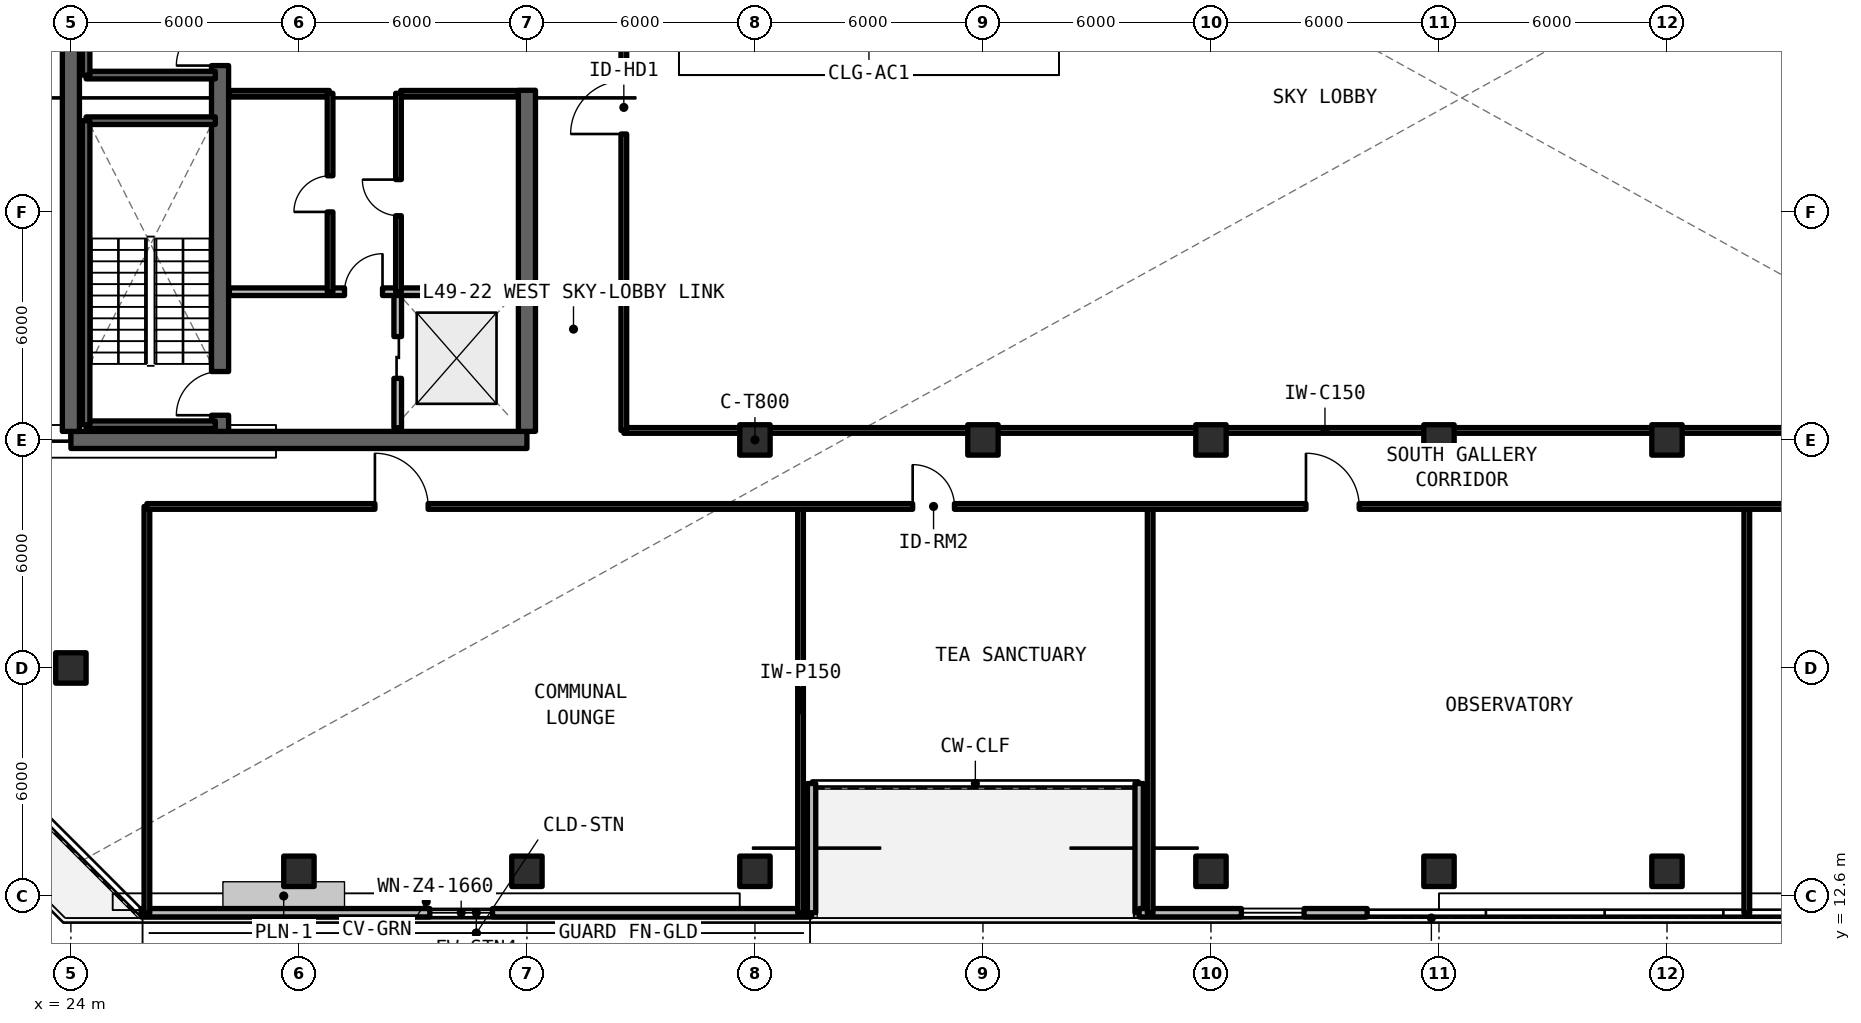
"""IFC4 building model, lengths in metres.
Left out: names, types, materials, properties, quantities, classifications, styles, units other than length and angle.
Written with IfcOpenShell. Run it as: python <this file> out.ifc"""

import sys

from ifc_helpers import new_model, si_unit, direction, frame, frame_2d, origin, origin_2d, place, context, subcontext, project, spatial, rectangle, extrude, element, fill, save


model = new_model("IFC4")
c1 = context("Model", 3, precision=1e-05, world=origin(), true_north=direction((0.0, 1.0)))
c2 = subcontext(c1, "Body", "Model", "MODEL_VIEW")
j1 = project(units=[si_unit("LENGTHUNIT", "METRE"), si_unit("PLANEANGLEUNIT", "RADIAN")], contexts=[c1])
p1 = place(None, origin())
s1 = spatial("IfcSite", under=j1, at=p1, CompositionType="ELEMENT")
p2 = place(p1, origin())
s2 = spatial("IfcBuilding", under=s1, at=p2, CompositionType="ELEMENT")
p3 = place(p2, frame((0.0, 0.0, 177.87)))
s3 = spatial("IfcBuildingStorey", under=s2, at=p3, CompositionType="ELEMENT", Elevation=177.87)
p4 = place(p3, frame((24.0, 24.6, 0.0), z_axis=(0.0, 0.0, 1.0), x_axis=(1.0, 0.0, 0.0)))
e1 = element("IfcWall", 1, at=p4, inside=s3, PredefinedType="SHEAR", context=c2, shape_type="SweptSolid", body=[
    extrude(rectangle(XDim=12.0, YDim=0.45, at=frame_2d((6.0, 0.0))), origin(), (0.0, 0.0, 1.0), 3.96),
])
p5 = place(p3, frame((24.0, 24.825, 0.0), z_axis=(0.0, 0.0, 1.0), x_axis=(0.0, 1.0, 0.0)))
e2 = element("IfcWall", 2, at=p5, inside=s3, PredefinedType="SHEAR", context=c2, shape_type="SweptSolid", body=[
    extrude(rectangle(XDim=17.55, YDim=0.45, at=frame_2d((8.775, 0.0))), origin(), (0.0, 0.0, 1.0), 3.96),
])
p6 = place(p3, frame((36.0, 24.825, 0.0), z_axis=(0.0, 0.0, 1.0), x_axis=(0.0, 1.0, 0.0)))
e3 = element("IfcWall", 3, at=p6, inside=s3, PredefinedType="SHEAR", context=c2, shape_type="SweptSolid", body=[
    extrude(rectangle(XDim=8.975, YDim=0.45, at=frame_2d((4.488, 0.0))), origin(), (0.0, 0.0, 1.0), 3.96),
])
p7 = place(p3, frame((27.925, 24.825, 0.0), z_axis=(0.0, 0.0, 1.0), x_axis=(0.0, 1.0, 0.0)))
e4 = element("IfcWall", 4, at=p7, inside=s3, PredefinedType="SHEAR", context=c2, shape_type="SweptSolid", body=[
    extrude(rectangle(XDim=17.55, YDim=0.45, at=frame_2d((8.775, 0.0))), origin(), (0.0, 0.0, 1.0), 3.96),
])
p8 = place(p7, frame((0.425, 0.0, 0.0)))
e5 = element("IfcOpeningElement", 5, at=p8, cuts=e4, PredefinedType="OPENING", context=c2, shape_type="SweptSolid", body=[
    extrude(rectangle(XDim=1.15, YDim=2.15, at=frame_2d((0.575, 1.075))), frame((0.0, 0.235, 0.0), z_axis=(0.0, -1.0, 0.0), x_axis=(1.0, 0.0, 0.0)), (0.0, 0.0, 1.0), 0.47),
])
p9 = place(p7, frame((9.625, 0.0, 0.0)))
e6 = element("IfcOpeningElement", 6, at=p9, cuts=e4, PredefinedType="OPENING", context=c2, shape_type="SweptSolid", body=[
    extrude(rectangle(XDim=1.15, YDim=2.15, at=frame_2d((0.575, 1.075))), frame((0.0, 0.235, 0.0), z_axis=(0.0, -1.0, 0.0), x_axis=(1.0, 0.0, 0.0)), (0.0, 0.0, 1.0), 0.47),
])
for number, where, z_axis, x_axis in (
    (7, (42.0, 24.6, 0.0), (0.0, 0.0, 1.0), (1.0, 0.0, 0.0)),
    (8, (48.0, 24.6, 0.0), (0.0, 0.0, 1.0), (1.0, 0.0, 0.0)),
    (9, (54.0, 24.6, 0.0), (0.0, 0.0, 1.0), (1.0, 0.0, 0.0)),
    (10, (60.0, 24.6, 0.0), (0.0, 0.0, 1.0), (1.0, 0.0, 0.0)),
    (11, (66.0, 24.6, 0.0), (0.0, 0.0, 1.0), (1.0, 0.0, 0.0)),
    (12, (24.0, 18.6, 0.0), (0.0, 0.0, 1.0), (1.0, 0.0, 0.0)),
):
    element("IfcColumn", number, at=place(p3, frame(where, z_axis=z_axis, x_axis=x_axis)), inside=s3, PredefinedType="COLUMN", context=c2, shape_type="SweptSolid", body=[
        extrude(rectangle(XDim=0.8, YDim=0.8, at=origin_2d()), origin(), (0.0, 0.0, 1.0), 3.96),
    ])
for number, where, z_axis, x_axis in (
    (13, (30.0, 13.25, -0.28), (0.0, 0.0, 1.0), (1.0, 0.0, 0.0)),
    (14, (36.0, 13.25, -0.28), (0.0, 0.0, 1.0), (1.0, 0.0, 0.0)),
    (15, (42.0, 13.25, -0.28), (0.0, 0.0, 1.0), (1.0, 0.0, 0.0)),
    (16, (54.0, 13.25, -0.28), (0.0, 0.0, 1.0), (1.0, 0.0, 0.0)),
    (17, (60.0, 13.25, -0.28), (0.0, 0.0, 1.0), (1.0, 0.0, 0.0)),
    (18, (66.0, 13.25, -0.28), (0.0, 0.0, 1.0), (1.0, 0.0, 0.0)),
):
    element("IfcColumn", number, at=place(p3, frame(where, z_axis=z_axis, x_axis=x_axis)), inside=s3, PredefinedType="COLUMN", context=c2, shape_type="SweptSolid", body=[
        extrude(rectangle(XDim=0.8, YDim=0.8, at=origin_2d()), origin(), (0.0, 0.0, 1.0), 4.24),
    ])
p10 = place(p3, frame((25.846, 12.16, 0.0), z_axis=(0.0, 0.0, 1.0), x_axis=(1.0, 0.0, 0.0)))
e19 = element("IfcWall", 19, at=p10, inside=s3, PredefinedType="SOLIDWALL", context=c2, shape_type="SweptSolid", body=[
    extrude(rectangle(XDim=17.644, YDim=0.22, at=frame_2d((8.822, 0.0))), origin(), (0.0, 0.0, 1.0), 3.74),
])
p11 = place(p10, frame((7.599, 0.0, 0.78)))
e20 = element("IfcOpeningElement", 20, at=p11, cuts=e19, PredefinedType="OPENING", context=c2, shape_type="SweptSolid", body=[
    extrude(rectangle(XDim=1.65, YDim=1.66, at=frame_2d((0.825, 0.83))), frame((0.0, 0.12, 0.0), z_axis=(0.0, -1.0, 0.0), x_axis=(1.0, 0.0, 0.0)), (0.0, 0.0, 1.0), 0.24),
])
for number, where, z_axis, x_axis in (
    (21, (43.49, 12.16, 0.0), (0.0, 0.0, 1.0), (0.0, 1.0, 0.0)),
    (22, (52.11, 15.56, 0.0), (0.0, 0.0, 1.0), (0.0, -1.0, 0.0)),
):
    element("IfcWall", number, at=place(p3, frame(where, z_axis=z_axis, x_axis=x_axis)), inside=s3, PredefinedType="SOLIDWALL", context=c2, shape_type="SweptSolid", body=[
        extrude(rectangle(XDim=3.4, YDim=0.22, at=frame_2d((1.7, 0.0))), origin(), (0.0, 0.0, 1.0), 3.74),
    ])
p12 = place(p3, frame((52.11, 12.16, 0.0), z_axis=(0.0, 0.0, 1.0), x_axis=(1.0, 0.0, 0.0)))
e23 = element("IfcWall", 23, at=p12, inside=s3, PredefinedType="SOLIDWALL", context=c2, shape_type="SweptSolid", body=[
    extrude(rectangle(XDim=6.0, YDim=0.22, at=frame_2d((3.0, 0.0))), origin(), (0.0, 0.0, 1.0), 3.74),
])
p13 = place(p12, frame((2.69, 0.0, 0.78)))
e24 = element("IfcOpeningElement", 24, at=p13, cuts=e23, PredefinedType="OPENING", context=c2, shape_type="SweptSolid", body=[
    extrude(rectangle(XDim=1.65, YDim=1.66, at=frame_2d((0.825, 0.83))), frame((0.0, 0.12, 0.0), z_axis=(0.0, -1.0, 0.0), x_axis=(1.0, 0.0, 0.0)), (0.0, 0.0, 1.0), 0.24),
])
p14 = place(p3, frame((32.6, 24.92, 0.0), z_axis=(0.0, 0.0, 1.0), x_axis=(0.0, 1.0, 0.0)))
e25 = element("IfcWall", 25, at=p14, inside=s3, PredefinedType="SOLIDWALL", context=c2, shape_type="SweptSolid", body=[
    extrude(rectangle(XDim=3.58, YDim=0.2, at=frame_2d((1.79, 0.0))), origin(), (0.0, 0.0, 1.0), 2.96),
])
p15 = place(p14, frame((1.3, 0.0, 0.0)))
e26 = element("IfcOpeningElement", 26, at=p15, cuts=e25, PredefinedType="OPENING", context=c2, shape_type="SweptSolid", body=[
    extrude(rectangle(XDim=1.1, YDim=2.2, at=frame_2d((0.55, 1.1))), frame((0.0, 0.11, 0.0), z_axis=(0.0, -1.0, 0.0), x_axis=(1.0, 0.0, 0.0)), (0.0, 0.0, 1.0), 0.22),
])
p16 = place(p3, frame((28.17, 28.5, 0.0), z_axis=(0.0, 0.0, 1.0), x_axis=(1.0, 0.0, 0.0)))
e27 = element("IfcWall", 27, at=p16, inside=s3, PredefinedType="SOLIDWALL", context=c2, shape_type="SweptSolid", body=[
    extrude(rectangle(XDim=7.585, YDim=0.2, at=frame_2d((3.792, 0.0))), origin(), (0.0, 0.0, 1.0), 2.96),
])
p17 = place(p16, frame((3.03, 0.0, 0.0)))
e28 = element("IfcOpeningElement", 28, at=p17, cuts=e27, PredefinedType="OPENING", context=c2, shape_type="SweptSolid", body=[
    extrude(rectangle(XDim=1.0, YDim=2.15, at=frame_2d((0.5, 1.075))), frame((0.0, 0.11, 0.0), z_axis=(0.0, -1.0, 0.0), x_axis=(1.0, 0.0, 0.0)), (0.0, 0.0, 1.0), 0.22),
])
p18 = place(p3, frame((28.17, 33.72, 0.0), z_axis=(0.0, 0.0, 1.0), x_axis=(1.0, 0.0, 0.0)))
e29 = element("IfcWall", 29, at=p18, inside=s3, PredefinedType="SOLIDWALL", context=c2, shape_type="SweptSolid", body=[
    extrude(rectangle(XDim=2.63, YDim=0.15, at=frame_2d((1.315, 0.0))), origin(), (0.0, 0.0, 1.0), 2.96),
])
p19 = place(p3, frame((30.82, 28.5, 0.0), z_axis=(0.0, 0.0, 1.0), x_axis=(0.0, 1.0, 0.0)))
e30 = element("IfcWall", 30, at=p19, inside=s3, PredefinedType="SOLIDWALL", context=c2, shape_type="SweptSolid", body=[
    extrude(rectangle(XDim=5.22, YDim=0.15, at=frame_2d((2.61, 0.0))), origin(), (0.0, 0.0, 1.0), 2.96),
])
p20 = place(p19, frame((2.1, 0.0, 0.0)))
e31 = element("IfcOpeningElement", 31, at=p20, cuts=e30, PredefinedType="OPENING", context=c2, shape_type="SweptSolid", body=[
    extrude(rectangle(XDim=0.95, YDim=2.15, at=frame_2d((0.475, 1.075))), frame((0.0, 0.085, 0.0), z_axis=(0.0, -1.0, 0.0), x_axis=(1.0, 0.0, 0.0)), (0.0, 0.0, 1.0), 0.17),
])
p21 = place(p3, frame((32.68, 33.72, 0.0), z_axis=(0.0, 0.0, 1.0), x_axis=(1.0, 0.0, 0.0)))
e32 = element("IfcWall", 32, at=p21, inside=s3, PredefinedType="SOLIDWALL", context=c2, shape_type="SweptSolid", body=[
    extrude(rectangle(XDim=3.075, YDim=0.15, at=frame_2d((1.538, 0.0))), origin(), (0.0, 0.0, 1.0), 2.96),
])
p22 = place(p3, frame((32.62, 28.5, 0.0), z_axis=(0.0, 0.0, 1.0), x_axis=(0.0, 1.0, 0.0)))
e33 = element("IfcWall", 33, at=p22, inside=s3, PredefinedType="SOLIDWALL", context=c2, shape_type="SweptSolid", body=[
    extrude(rectangle(XDim=5.22, YDim=0.15, at=frame_2d((2.61, 0.0))), origin(), (0.0, 0.0, 1.0), 2.96),
])
p23 = place(p22, frame((2.0, 0.0, 0.0)))
e34 = element("IfcOpeningElement", 34, at=p23, cuts=e33, PredefinedType="OPENING", context=c2, shape_type="SweptSolid", body=[
    extrude(rectangle(XDim=0.95, YDim=2.15, at=frame_2d((0.475, 1.075))), frame((0.0, 0.085, 0.0), z_axis=(0.0, -1.0, 0.0), x_axis=(1.0, 0.0, 0.0)), (0.0, 0.0, 1.0), 0.17),
])
p24 = place(p3, frame((38.55, 24.85, 0.0), z_axis=(0.0, 0.0, 1.0), x_axis=(1.0, 0.0, 0.0)))
e35 = element("IfcWall", 35, at=p24, inside=s3, PredefinedType="SOLIDWALL", context=c2, shape_type="SweptSolid", body=[
    extrude(rectangle(XDim=36.9, YDim=0.15, at=frame_2d((18.45, 0.0))), origin(), (0.0, 0.0, 1.0), 2.96),
])
p25 = place(p3, frame((38.55, 24.85, 0.0), z_axis=(0.0, 0.0, 1.0), x_axis=(0.0, 1.0, 0.0)))
e36 = element("IfcWall", 36, at=p25, inside=s3, PredefinedType="SOLIDWALL", context=c2, shape_type="SweptSolid", body=[
    extrude(rectangle(XDim=17.5, YDim=0.15, at=frame_2d((8.75, 0.0))), origin(), (0.0, 0.0, 1.0), 2.96),
])
p26 = place(p25, frame((7.8, 0.0, 0.0)))
e37 = element("IfcOpeningElement", 37, at=p26, cuts=e36, PredefinedType="OPENING", context=c2, shape_type="SweptSolid", body=[
    extrude(rectangle(XDim=1.4, YDim=2.15, at=frame_2d((0.7, 1.075))), frame((0.0, 0.085, 0.0), z_axis=(0.0, -1.0, 0.0), x_axis=(1.0, 0.0, 0.0)), (0.0, 0.0, 1.0), 0.17),
])
p27 = place(p3, frame((26.0, 12.15, 0.0), z_axis=(0.0, 0.0, 1.0), x_axis=(0.0, 1.0, 0.0)))
e38 = element("IfcWall", 38, at=p27, inside=s3, PredefinedType="SOLIDWALL", context=c2, shape_type="SweptSolid", body=[
    extrude(rectangle(XDim=10.7, YDim=0.15, at=frame_2d((5.35, 0.0))), origin(), (0.0, 0.0, 1.0), 2.96),
])
for number, where, z_axis, x_axis in (
    (39, (43.2, 12.15, 0.0), (0.0, 0.0, 1.0), (0.0, 1.0, 0.0)),
    (40, (52.4, 12.15, 0.0), (0.0, 0.0, 1.0), (0.0, 1.0, 0.0)),
    (41, (68.1, 12.15, 0.0), (0.0, 0.0, 1.0), (0.0, 1.0, 0.0)),
):
    element("IfcWall", number, at=place(p3, frame(where, z_axis=z_axis, x_axis=x_axis)), inside=s3, PredefinedType="PARTITIONING", context=c2, shape_type="SweptSolid", body=[
        extrude(rectangle(XDim=10.7, YDim=0.15, at=frame_2d((5.35, 0.0))), origin(), (0.0, 0.0, 1.0), 2.96),
    ])
p28 = place(p3, frame((26.0, 22.85, 0.0), z_axis=(0.0, 0.0, 1.0), x_axis=(1.0, 0.0, 0.0)))
e42 = element("IfcWall", 42, at=p28, inside=s3, PredefinedType="SOLIDWALL", context=c2, shape_type="SweptSolid", body=[
    extrude(rectangle(XDim=69.2, YDim=0.15, at=frame_2d((34.6, 0.0))), origin(), (0.0, 0.0, 1.0), 2.96),
])
p29 = place(p28, frame((6.0, 0.0, 0.0)))
e43 = element("IfcOpeningElement", 43, at=p29, cuts=e42, PredefinedType="OPENING", context=c2, shape_type="SweptSolid", body=[
    extrude(rectangle(XDim=1.4, YDim=2.15, at=frame_2d((0.7, 1.075))), frame((0.0, 0.085, 0.0), z_axis=(0.0, -1.0, 0.0), x_axis=(1.0, 0.0, 0.0)), (0.0, 0.0, 1.0), 0.17),
])
p30 = place(p28, frame((20.15, 0.0, 0.0)))
e44 = element("IfcOpeningElement", 44, at=p30, cuts=e42, PredefinedType="OPENING", context=c2, shape_type="SweptSolid", body=[
    extrude(rectangle(XDim=1.1, YDim=2.15, at=frame_2d((0.55, 1.075))), frame((0.0, 0.085, 0.0), z_axis=(0.0, -1.0, 0.0), x_axis=(1.0, 0.0, 0.0)), (0.0, 0.0, 1.0), 0.17),
])
p31 = place(p28, frame((30.5, 0.0, 0.0)))
e45 = element("IfcOpeningElement", 45, at=p31, cuts=e42, PredefinedType="OPENING", context=c2, shape_type="SweptSolid", body=[
    extrude(rectangle(XDim=1.4, YDim=2.15, at=frame_2d((0.7, 1.075))), frame((0.0, 0.085, 0.0), z_axis=(0.0, -1.0, 0.0), x_axis=(1.0, 0.0, 0.0)), (0.0, 0.0, 1.0), 0.17),
])
p32 = place(p28, frame((47.0, 0.0, 0.0)))
e46 = element("IfcOpeningElement", 46, at=p32, cuts=e42, PredefinedType="OPENING", context=c2, shape_type="SweptSolid", body=[
    extrude(rectangle(XDim=0.95, YDim=2.15, at=frame_2d((0.475, 1.075))), frame((0.0, 0.085, 0.0), z_axis=(0.0, -1.0, 0.0), x_axis=(1.0, 0.0, 0.0)), (0.0, 0.0, 1.0), 0.17),
])
for number, where, z_axis, x_axis in (
    (47, (24.4, 25.0, 0.0), (0.0, 0.0, 1.0), (1.0, 0.0, 0.0)),
    (48, (27.8, 33.0, 0.0), (0.0, 0.0, 1.0), (-1.0, 0.0, 0.0)),
):
    element("IfcWall", number, at=place(p3, frame(where, z_axis=z_axis, x_axis=x_axis)), inside=s3, PredefinedType="SOLIDWALL", context=c2, shape_type="SweptSolid", body=[
        extrude(rectangle(XDim=3.4, YDim=0.2, at=frame_2d((1.7, 0.0))), origin(), (0.0, 0.0, 1.0), 3.96),
    ])
p33 = place(p3, frame((24.4, 33.0, 0.0), z_axis=(0.0, 0.0, 1.0), x_axis=(0.0, -1.0, 0.0)))
e49 = element("IfcWall", 49, at=p33, inside=s3, PredefinedType="SOLIDWALL", context=c2, shape_type="SweptSolid", body=[
    extrude(rectangle(XDim=8.0, YDim=0.2, at=frame_2d((4.0, 0.0))), origin(), (0.0, 0.0, 1.0), 3.96),
])
p34 = place(p3, frame((24.4, 34.2, 0.0), z_axis=(0.0, 0.0, 1.0), x_axis=(1.0, 0.0, 0.0)))
e50 = element("IfcWall", 50, at=p34, inside=s3, PredefinedType="SOLIDWALL", context=c2, shape_type="SweptSolid", body=[
    extrude(rectangle(XDim=3.4, YDim=0.2, at=frame_2d((1.7, 0.0))), origin(), (0.0, 0.0, 1.0), 3.96),
])
p35 = place(p3, frame((24.4, 42.2, 0.0), z_axis=(0.0, 0.0, 1.0), x_axis=(0.0, -1.0, 0.0)))
e51 = element("IfcWall", 51, at=p35, inside=s3, PredefinedType="SOLIDWALL", context=c2, shape_type="SweptSolid", body=[
    extrude(rectangle(XDim=8.0, YDim=0.2, at=frame_2d((4.0, 0.0))), origin(), (0.0, 0.0, 1.0), 3.96),
])
p36 = place(p11, origin())
e52 = element("IfcWindow", 52, at=p36, inside=s3, PartitioningType="SINGLE_PANEL", PredefinedType="WINDOW", context=c2, shape_type="SweptSolid", body=[
    extrude(rectangle(XDim=1.65, YDim=1.66, at=frame_2d((0.825, 0.83))), frame((0.0, 0.03, 0.0), z_axis=(0.0, -1.0, 0.0), x_axis=(1.0, 0.0, 0.0)), (0.0, 0.0, 1.0), 0.06),
])
fill(e20, e52)
p37 = place(p13, origin())
e53 = element("IfcWindow", 53, at=p37, inside=s3, PartitioningType="SINGLE_PANEL", PredefinedType="WINDOW", context=c2, shape_type="SweptSolid", body=[
    extrude(rectangle(XDim=1.65, YDim=1.66, at=frame_2d((0.825, 0.83))), frame((0.0, 0.03, 0.0), z_axis=(0.0, -1.0, 0.0), x_axis=(1.0, 0.0, 0.0)), (0.0, 0.0, 1.0), 0.06),
])
fill(e24, e53)
p38 = place(p15, origin())
e54 = element("IfcDoor", 54, at=p38, inside=s3, OperationType="SLIDING_TO_LEFT", PredefinedType="DOOR", context=c2, shape_type="SweptSolid", body=[
    extrude(rectangle(XDim=1.1, YDim=2.2, at=frame_2d((0.55, 1.1))), frame((0.0, 0.025, 0.0), z_axis=(0.0, -1.0, 0.0), x_axis=(1.0, 0.0, 0.0)), (0.0, 0.0, 1.0), 0.05),
])
fill(e26, e54)
p39 = place(p17, origin())
e55 = element("IfcDoor", 55, at=p39, inside=s3, OperationType="SINGLE_SWING_RIGHT", PredefinedType="DOOR", context=c2, shape_type="SweptSolid", body=[
    extrude(rectangle(XDim=1.0, YDim=2.15, at=frame_2d((0.5, 1.075))), frame((0.0, 0.025, 0.0), z_axis=(0.0, -1.0, 0.0), x_axis=(1.0, 0.0, 0.0)), (0.0, 0.0, 1.0), 0.05),
])
fill(e28, e55)
p40 = place(p20, origin())
e56 = element("IfcDoor", 56, at=p40, inside=s3, OperationType="SINGLE_SWING_LEFT", PredefinedType="DOOR", context=c2, shape_type="SweptSolid", body=[
    extrude(rectangle(XDim=0.95, YDim=2.15, at=frame_2d((0.475, 1.075))), frame((0.0, 0.025, 0.0), z_axis=(0.0, -1.0, 0.0), x_axis=(1.0, 0.0, 0.0)), (0.0, 0.0, 1.0), 0.05),
])
fill(e31, e56)
p41 = place(p23, origin())
e57 = element("IfcDoor", 57, at=p41, inside=s3, OperationType="SINGLE_SWING_RIGHT", PredefinedType="DOOR", context=c2, shape_type="SweptSolid", body=[
    extrude(rectangle(XDim=0.95, YDim=2.15, at=frame_2d((0.475, 1.075))), frame((0.0, 0.025, 0.0), z_axis=(0.0, -1.0, 0.0), x_axis=(1.0, 0.0, 0.0)), (0.0, 0.0, 1.0), 0.05),
])
fill(e34, e57)
p42 = place(p26, origin())
e58 = element("IfcDoor", 58, at=p42, inside=s3, OperationType="SINGLE_SWING_LEFT", PredefinedType="DOOR", context=c2, shape_type="SweptSolid", body=[
    extrude(rectangle(XDim=1.4, YDim=2.15, at=frame_2d((0.7, 1.075))), frame((0.0, 0.025, 0.0), z_axis=(0.0, -1.0, 0.0), x_axis=(1.0, 0.0, 0.0)), (0.0, 0.0, 1.0), 0.05),
])
fill(e37, e58)
p43 = place(p29, origin())
e59 = element("IfcDoor", 59, at=p43, inside=s3, OperationType="SINGLE_SWING_RIGHT", PredefinedType="DOOR", context=c2, shape_type="SweptSolid", body=[
    extrude(rectangle(XDim=1.4, YDim=2.15, at=frame_2d((0.7, 1.075))), frame((0.0, 0.025, 0.0), z_axis=(0.0, -1.0, 0.0), x_axis=(1.0, 0.0, 0.0)), (0.0, 0.0, 1.0), 0.05),
])
fill(e43, e59)
p44 = place(p30, origin())
e60 = element("IfcDoor", 60, at=p44, inside=s3, OperationType="SINGLE_SWING_LEFT", PredefinedType="DOOR", context=c2, shape_type="SweptSolid", body=[
    extrude(rectangle(XDim=1.1, YDim=2.15, at=frame_2d((0.55, 1.075))), frame((0.0, 0.025, 0.0), z_axis=(0.0, -1.0, 0.0), x_axis=(1.0, 0.0, 0.0)), (0.0, 0.0, 1.0), 0.05),
])
fill(e44, e60)
p45 = place(p31, origin())
e61 = element("IfcDoor", 61, at=p45, inside=s3, OperationType="SINGLE_SWING_RIGHT", PredefinedType="DOOR", context=c2, shape_type="SweptSolid", body=[
    extrude(rectangle(XDim=1.4, YDim=2.15, at=frame_2d((0.7, 1.075))), frame((0.0, 0.025, 0.0), z_axis=(0.0, -1.0, 0.0), x_axis=(1.0, 0.0, 0.0)), (0.0, 0.0, 1.0), 0.05),
])
fill(e45, e61)
p46 = place(p8, origin())
e62 = element("IfcDoor", 62, at=p46, inside=s3, OperationType="SINGLE_SWING_LEFT", PredefinedType="DOOR", context=c2, shape_type="SweptSolid", body=[
    extrude(rectangle(XDim=1.15, YDim=2.15, at=frame_2d((0.575, 1.075))), frame((0.0, 0.025, 0.0), z_axis=(0.0, -1.0, 0.0), x_axis=(1.0, 0.0, 0.0)), (0.0, 0.0, 1.0), 0.05),
])
fill(e5, e62)
p47 = place(p9, origin())
e63 = element("IfcDoor", 63, at=p47, inside=s3, OperationType="SINGLE_SWING_RIGHT", PredefinedType="DOOR", context=c2, shape_type="SweptSolid", body=[
    extrude(rectangle(XDim=1.15, YDim=2.15, at=frame_2d((0.575, 1.075))), frame((0.0, 0.025, 0.0), z_axis=(0.0, -1.0, 0.0), x_axis=(1.0, 0.0, 0.0)), (0.0, 0.0, 1.0), 0.05),
])
fill(e6, e63)
save(model, sys.argv[1])
